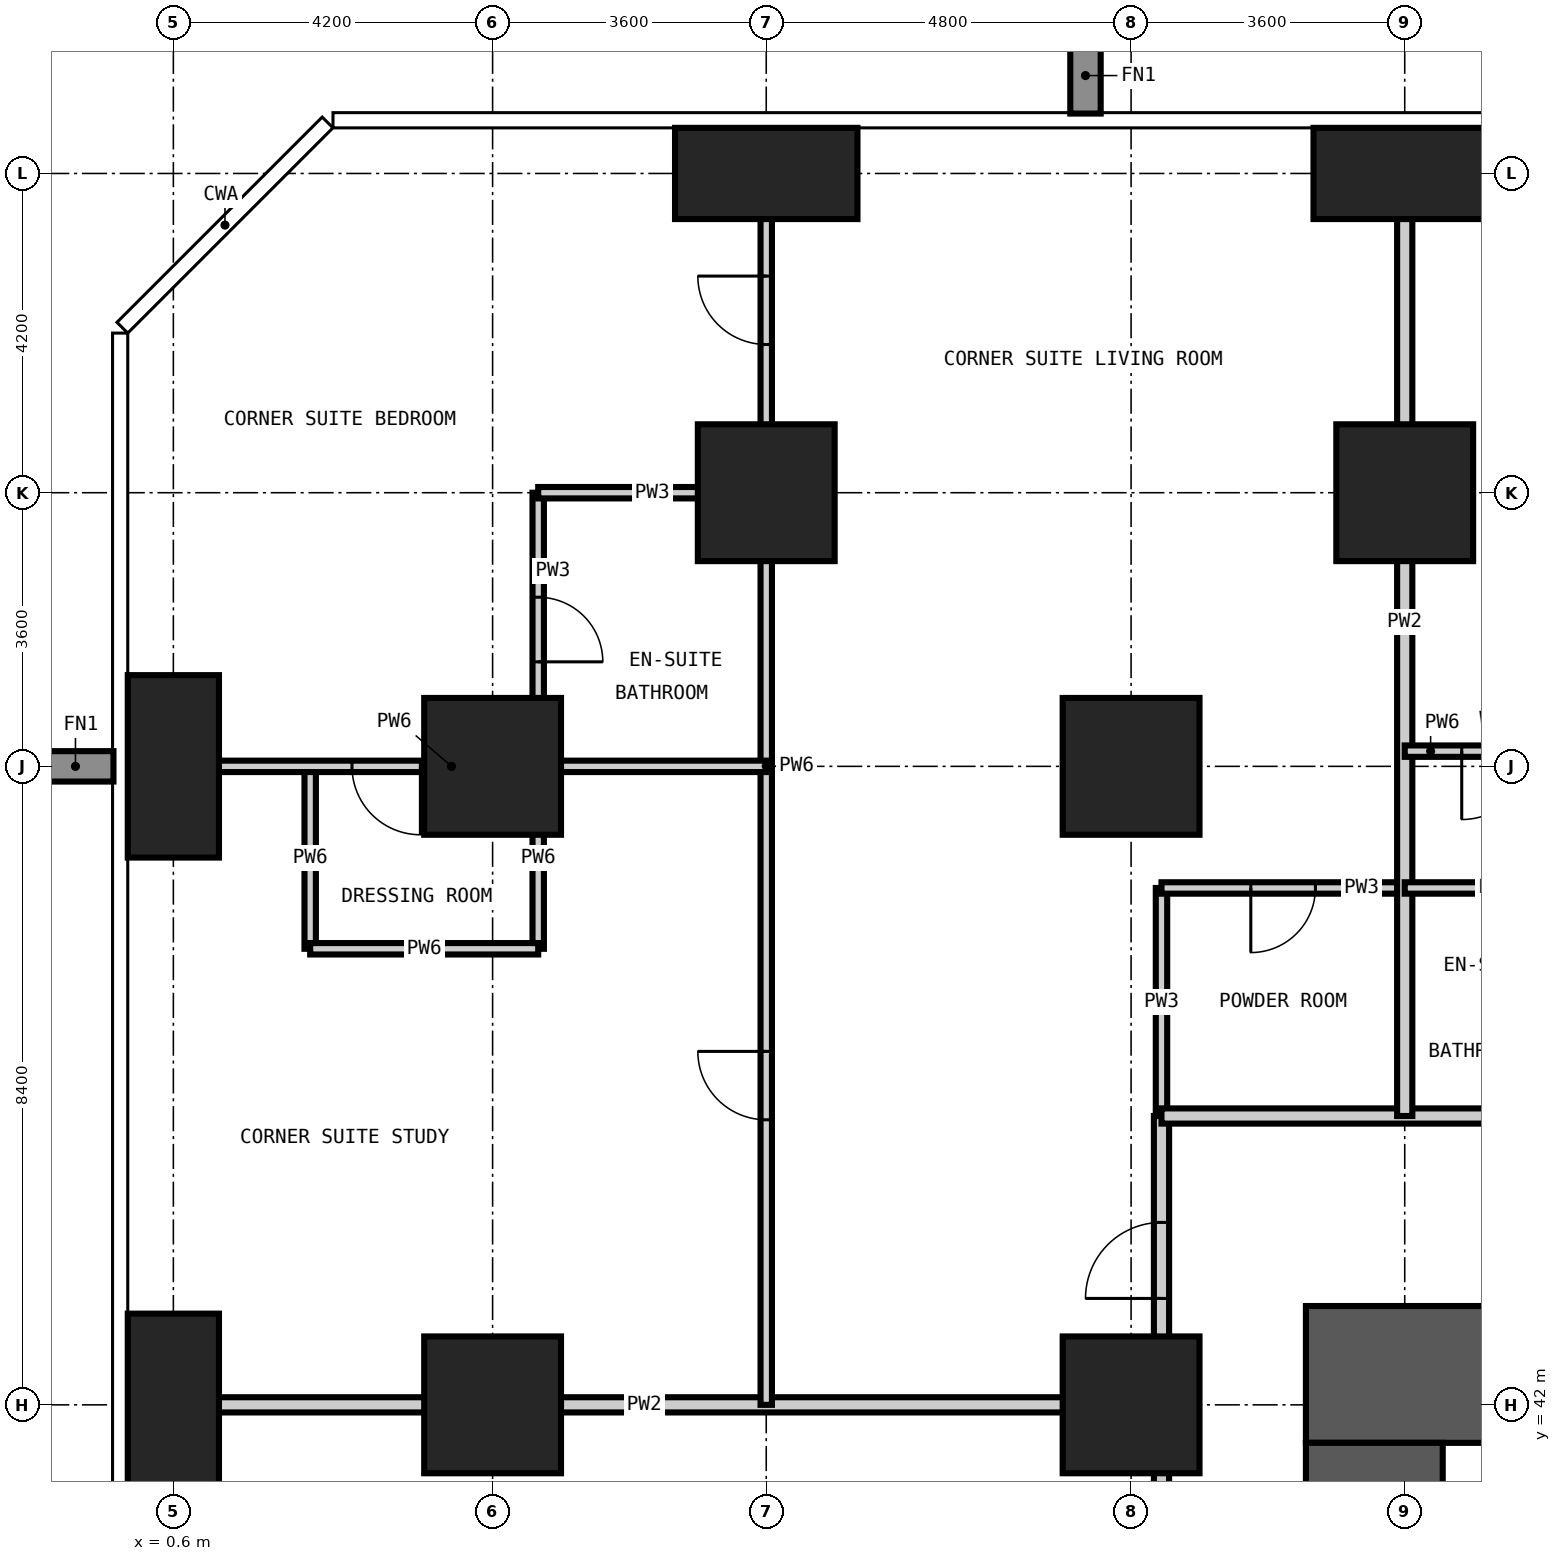
"""IFC4 building model, lengths in metres.
Left out: names, types, materials, properties, quantities, classifications, styles, units other than length and angle.
Written with IfcOpenShell. Run it as: python <this file> out.ifc"""

import sys

from ifc_helpers import new_model, si_unit, direction, frame, frame_2d, origin, origin_2d, place, context, subcontext, project, spatial, rectangle, extrude, element, fill, save


model = new_model("IFC4")
c1 = context("Model", 3, precision=1e-05, world=origin(), true_north=direction((0.0, 1.0)))
c2 = subcontext(c1, "Body", "Model", "MODEL_VIEW")
j1 = project(units=[si_unit("LENGTHUNIT", "METRE"), si_unit("PLANEANGLEUNIT", "RADIAN")], contexts=[c1])
p1 = place(None, origin())
s1 = spatial("IfcSite", under=j1, at=p1, CompositionType="ELEMENT")
p2 = place(p1, origin())
s2 = spatial("IfcBuilding", under=s1, at=p2, CompositionType="ELEMENT")
p3 = place(p2, frame((0.0, 0.0, 30.6)))
s3 = spatial("IfcBuildingStorey", under=s2, at=p3, CompositionType="ELEMENT", Elevation=30.6)
for number, where, z_axis, x_axis in (
    (1, (0.6, 42.0, -0.35), (0.0, 0.0, 1.0), (1.0, 0.0, 0.0)),
    (2, (0.6, 50.4, -0.35), (0.0, 0.0, 1.0), (1.0, 0.0, 0.0)),
):
    element("IfcColumn", number, at=place(p3, frame(where, z_axis=z_axis, x_axis=x_axis)), inside=s3, PredefinedType="COLUMN", context=c2, shape_type="SweptSolid", body=[
        extrude(rectangle(XDim=1.2, YDim=2.4, at=origin_2d()), origin(), (0.0, 0.0, 1.0), 3.6),
    ])
for number, where, z_axis, x_axis in (
    (3, (4.8, 42.0, -0.35), (0.0, 0.0, 1.0), (1.0, 0.0, 0.0)),
    (4, (4.8, 50.4, -0.35), (0.0, 0.0, 1.0), (1.0, 0.0, 0.0)),
    (5, (8.4, 54.0, -0.35), (0.0, 0.0, 1.0), (1.0, 0.0, 0.0)),
):
    element("IfcColumn", number, at=place(p3, frame(where, z_axis=z_axis, x_axis=x_axis)), inside=s3, PredefinedType="COLUMN", context=c2, shape_type="SweptSolid", body=[
        extrude(rectangle(XDim=1.8, YDim=1.8, at=origin_2d()), origin(), (0.0, 0.0, 1.0), 3.6),
    ])
p4 = place(p3, frame((8.4, 58.2, -0.35), z_axis=(0.0, 0.0, 1.0), x_axis=(1.0, 0.0, 0.0)))
e6 = element("IfcColumn", 6, at=p4, inside=s3, PredefinedType="COLUMN", context=c2, shape_type="SweptSolid", body=[
    extrude(rectangle(XDim=2.4, YDim=1.2, at=origin_2d()), origin(), (0.0, 0.0, 1.0), 3.6),
])
for number, where, z_axis, x_axis in (
    (7, (13.2, 42.0, -0.35), (0.0, 0.0, 1.0), (1.0, 0.0, 0.0)),
    (8, (13.2, 50.4, -0.35), (0.0, 0.0, 1.0), (1.0, 0.0, 0.0)),
    (9, (16.8, 54.0, -0.35), (0.0, 0.0, 1.0), (1.0, 0.0, 0.0)),
):
    element("IfcColumn", number, at=place(p3, frame(where, z_axis=z_axis, x_axis=x_axis)), inside=s3, PredefinedType="COLUMN", context=c2, shape_type="SweptSolid", body=[
        extrude(rectangle(XDim=1.8, YDim=1.8, at=origin_2d()), origin(), (0.0, 0.0, 1.0), 3.6),
    ])
p5 = place(p3, frame((16.8, 58.2, -0.35), z_axis=(0.0, 0.0, 1.0), x_axis=(1.0, 0.0, 0.0)))
e10 = element("IfcColumn", 10, at=p5, inside=s3, PredefinedType="COLUMN", context=c2, shape_type="SweptSolid", body=[
    extrude(rectangle(XDim=2.4, YDim=1.2, at=origin_2d()), origin(), (0.0, 0.0, 1.0), 3.6),
])
p6 = place(p3, frame((43.3, 42.4, -0.35), z_axis=(0.0, 0.0, 1.0), x_axis=(-1.0, 0.0, 0.0)))
e11 = element("IfcWall", 11, at=p6, inside=s3, PredefinedType="SHEAR", context=c2, shape_type="SweptSolid", body=[
    extrude(rectangle(XDim=27.8, YDim=1.8, at=frame_2d((13.9, 0.0))), origin(), (0.0, 0.0, 1.0), 3.6),
])
p7 = place(p6, frame((21.8, 0.0, 0.35)))
e12 = element("IfcOpeningElement", 12, at=p7, cuts=e11, PredefinedType="OPENING", context=c2, shape_type="SweptSolid", body=[
    extrude(rectangle(XDim=1.0, YDim=2.1, at=frame_2d((0.5, 1.05))), frame((0.0, 0.91, 0.0), z_axis=(0.0, -1.0, 0.0), x_axis=(1.0, 0.0, 0.0)), (0.0, 0.0, 1.0), 1.82),
])
p8 = place(p6, frame((11.2, 0.0, 0.35)))
e13 = element("IfcOpeningElement", 13, at=p8, cuts=e11, PredefinedType="OPENING", context=c2, shape_type="SweptSolid", body=[
    extrude(rectangle(XDim=1.2, YDim=2.2, at=frame_2d((0.6, 1.1))), frame((0.0, 0.91, 0.0), z_axis=(0.0, -1.0, 0.0), x_axis=(1.0, 0.0, 0.0)), (0.0, 0.0, 1.0), 1.82),
])
p9 = place(p3, frame((16.4, 41.5, -0.35), z_axis=(0.0, 0.0, 1.0), x_axis=(0.0, -1.0, 0.0)))
e14 = element("IfcWall", 14, at=p9, inside=s3, PredefinedType="SHEAR", context=c2, shape_type="SweptSolid", body=[
    extrude(rectangle(XDim=24.2, YDim=1.8, at=frame_2d((12.1, 0.0))), origin(), (0.0, 0.0, 1.0), 3.6),
])
p10 = place(p9, frame((11.2, 0.0, 0.35)))
e15 = element("IfcOpeningElement", 15, at=p10, cuts=e14, PredefinedType="OPENING", context=c2, shape_type="SweptSolid", body=[
    extrude(rectangle(XDim=1.8, YDim=2.2, at=frame_2d((0.9, 1.1))), frame((0.0, 0.91, 0.0), z_axis=(0.0, -1.0, 0.0), x_axis=(1.0, 0.0, 0.0)), (0.0, 0.0, 1.0), 1.82),
])
p11 = place(p9, frame((20.0, 0.0, 0.35)))
e16 = element("IfcOpeningElement", 16, at=p11, cuts=e14, PredefinedType="OPENING", context=c2, shape_type="SweptSolid", body=[
    extrude(rectangle(XDim=1.0, YDim=2.1, at=frame_2d((0.5, 1.05))), frame((0.0, 0.91, 0.0), z_axis=(0.0, -1.0, 0.0), x_axis=(1.0, 0.0, 0.0)), (0.0, 0.0, 1.0), 1.82),
])
p12 = place(p9, frame((5.3, 0.0, 0.35)))
e17 = element("IfcOpeningElement", 17, at=p12, cuts=e14, PredefinedType="OPENING", context=c2, shape_type="SweptSolid", body=[
    extrude(rectangle(XDim=1.0, YDim=2.1, at=frame_2d((0.5, 1.05))), frame((0.0, 0.91, 0.0), z_axis=(0.0, -1.0, 0.0), x_axis=(1.0, 0.0, 0.0)), (0.0, 0.0, 1.0), 1.82),
])
p13 = place(p3, frame((5.4, 50.4, 0.0), z_axis=(0.0, 0.0, 1.0), x_axis=(0.0, 1.0, 0.0)))
e18 = element("IfcWall", 18, at=p13, inside=s3, PredefinedType="PARTITIONING", context=c2, shape_type="SweptSolid", body=[
    extrude(rectangle(XDim=3.6, YDim=0.15, at=frame_2d((1.8, 0.0))), origin(), (0.0, 0.0, 1.0), 3.25),
])
p14 = place(p13, frame((1.375, 0.0, 0.0)))
e19 = element("IfcOpeningElement", 19, at=p14, cuts=e18, PredefinedType="OPENING", context=c2, shape_type="SweptSolid", body=[
    extrude(rectangle(XDim=0.85, YDim=2.1, at=frame_2d((0.425, 1.05))), frame((0.0, 0.085, 0.0), z_axis=(0.0, -1.0, 0.0), x_axis=(1.0, 0.0, 0.0)), (0.0, 0.0, 1.0), 0.17),
])
p15 = place(p3, frame((13.6, 45.8, 0.0), z_axis=(0.0, 0.0, 1.0), x_axis=(0.0, 1.0, 0.0)))
e20 = element("IfcWall", 20, at=p15, inside=s3, PredefinedType="PARTITIONING", context=c2, shape_type="SweptSolid", body=[
    extrude(rectangle(XDim=3.0, YDim=0.15, at=frame_2d((1.5, 0.0))), origin(), (0.0, 0.0, 1.0), 3.25),
])
p16 = place(p3, frame((13.6, 48.8, 0.0), z_axis=(0.0, 0.0, 1.0), x_axis=(1.0, 0.0, 0.0)))
e21 = element("IfcWall", 21, at=p16, inside=s3, PredefinedType="PARTITIONING", context=c2, shape_type="SweptSolid", body=[
    extrude(rectangle(XDim=3.2, YDim=0.15, at=frame_2d((1.6, 0.0))), origin(), (0.0, 0.0, 1.0), 3.25),
])
p17 = place(p16, frame((1.175, 0.0, 0.0)))
e22 = element("IfcOpeningElement", 22, at=p17, cuts=e21, PredefinedType="OPENING", context=c2, shape_type="SweptSolid", body=[
    extrude(rectangle(XDim=0.85, YDim=2.1, at=frame_2d((0.425, 1.05))), frame((0.0, 0.085, 0.0), z_axis=(0.0, -1.0, 0.0), x_axis=(1.0, 0.0, 0.0)), (0.0, 0.0, 1.0), 0.17),
])
p18 = place(p3, frame((5.4, 54.0, 0.0), z_axis=(0.0, 0.0, 1.0), x_axis=(1.0, 0.0, 0.0)))
e23 = element("IfcWall", 23, at=p18, inside=s3, PredefinedType="PARTITIONING", context=c2, shape_type="SweptSolid", body=[
    extrude(rectangle(XDim=3.0, YDim=0.15, at=frame_2d((1.5, 0.0))), origin(), (0.0, 0.0, 1.0), 3.25),
])
p19 = place(p3, frame((13.6, 42.0, 0.0), z_axis=(0.0, 0.0, 1.0), x_axis=(0.0, 1.0, 0.0)))
e24 = element("IfcWall", 24, at=p19, inside=s3, PredefinedType="PARTITIONING", context=c2, shape_type="SweptSolid", body=[
    extrude(rectangle(XDim=3.8, YDim=0.2, at=frame_2d((1.9, 0.0))), origin(), (0.0, 0.0, 1.0), 3.25),
])
p20 = place(p19, frame((1.4, 0.0, 0.0)))
e25 = element("IfcOpeningElement", 25, at=p20, cuts=e24, PredefinedType="OPENING", context=c2, shape_type="SweptSolid", body=[
    extrude(rectangle(XDim=1.0, YDim=2.2, at=frame_2d((0.5, 1.1))), frame((0.0, 0.11, 0.0), z_axis=(0.0, -1.0, 0.0), x_axis=(1.0, 0.0, 0.0)), (0.0, 0.0, 1.0), 0.22),
])
p21 = place(p3, frame((13.6, 45.8, 0.0), z_axis=(0.0, 0.0, 1.0), x_axis=(1.0, 0.0, 0.0)))
e26 = element("IfcWall", 26, at=p21, inside=s3, PredefinedType="PARTITIONING", context=c2, shape_type="SweptSolid", body=[
    extrude(rectangle(XDim=31.9, YDim=0.2, at=frame_2d((15.95, 0.0))), origin(), (0.0, 0.0, 1.0), 3.25),
])
p22 = place(p21, frame((6.0, 0.0, 0.0)))
e27 = element("IfcOpeningElement", 27, at=p22, cuts=e26, PredefinedType="OPENING", context=c2, shape_type="SweptSolid", body=[
    extrude(rectangle(XDim=1.0, YDim=2.2, at=frame_2d((0.5, 1.1))), frame((0.0, 0.11, 0.0), z_axis=(0.0, -1.0, 0.0), x_axis=(1.0, 0.0, 0.0)), (0.0, 0.0, 1.0), 0.22),
])
p23 = place(p21, frame((7.8, 0.0, 0.0)))
e28 = element("IfcOpeningElement", 28, at=p23, cuts=e26, PredefinedType="OPENING", context=c2, shape_type="SweptSolid", body=[
    extrude(rectangle(XDim=1.0, YDim=2.2, at=frame_2d((0.5, 1.1))), frame((0.0, 0.11, 0.0), z_axis=(0.0, -1.0, 0.0), x_axis=(1.0, 0.0, 0.0)), (0.0, 0.0, 1.0), 0.22),
])
p24 = place(p21, frame((14.4, 0.0, 0.0)))
e29 = element("IfcOpeningElement", 29, at=p24, cuts=e26, PredefinedType="OPENING", context=c2, shape_type="SweptSolid", body=[
    extrude(rectangle(XDim=1.0, YDim=2.2, at=frame_2d((0.5, 1.1))), frame((0.0, 0.11, 0.0), z_axis=(0.0, -1.0, 0.0), x_axis=(1.0, 0.0, 0.0)), (0.0, 0.0, 1.0), 0.22),
])
p25 = place(p21, frame((16.2, 0.0, 0.0)))
e30 = element("IfcOpeningElement", 30, at=p25, cuts=e26, PredefinedType="OPENING", context=c2, shape_type="SweptSolid", body=[
    extrude(rectangle(XDim=1.0, YDim=2.2, at=frame_2d((0.5, 1.1))), frame((0.0, 0.11, 0.0), z_axis=(0.0, -1.0, 0.0), x_axis=(1.0, 0.0, 0.0)), (0.0, 0.0, 1.0), 0.22),
])
p26 = place(p21, frame((22.8, 0.0, 0.0)))
e31 = element("IfcOpeningElement", 31, at=p26, cuts=e26, PredefinedType="OPENING", context=c2, shape_type="SweptSolid", body=[
    extrude(rectangle(XDim=1.0, YDim=2.2, at=frame_2d((0.5, 1.1))), frame((0.0, 0.11, 0.0), z_axis=(0.0, -1.0, 0.0), x_axis=(1.0, 0.0, 0.0)), (0.0, 0.0, 1.0), 0.22),
])
p27 = place(p21, frame((24.6, 0.0, 0.0)))
e32 = element("IfcOpeningElement", 32, at=p27, cuts=e26, PredefinedType="OPENING", context=c2, shape_type="SweptSolid", body=[
    extrude(rectangle(XDim=1.0, YDim=2.2, at=frame_2d((0.5, 1.1))), frame((0.0, 0.11, 0.0), z_axis=(0.0, -1.0, 0.0), x_axis=(1.0, 0.0, 0.0)), (0.0, 0.0, 1.0), 0.22),
])
p28 = place(p3, frame((13.6, 42.0, 0.0), z_axis=(0.0, 0.0, 1.0), x_axis=(0.0, -1.0, 0.0)))
e33 = element("IfcWall", 33, at=p28, inside=s3, PredefinedType="PARTITIONING", context=c2, shape_type="SweptSolid", body=[
    extrude(rectangle(XDim=8.4, YDim=0.2, at=frame_2d((4.2, 0.0))), origin(), (0.0, 0.0, 1.0), 3.25),
])
p29 = place(p28, frame((3.3, 0.0, 0.0)))
e34 = element("IfcOpeningElement", 34, at=p29, cuts=e33, PredefinedType="OPENING", context=c2, shape_type="SweptSolid", body=[
    extrude(rectangle(XDim=1.8, YDim=2.4, at=frame_2d((0.9, 1.2))), frame((0.0, 0.11, 0.0), z_axis=(0.0, -1.0, 0.0), x_axis=(1.0, 0.0, 0.0)), (0.0, 0.0, 1.0), 0.22),
])
p30 = place(p3, frame((16.8, 45.8, 0.0), z_axis=(0.0, 0.0, 1.0), x_axis=(0.0, 1.0, 0.0)))
e35 = element("IfcWall", 35, at=p30, inside=s3, PredefinedType="PARTITIONING", context=c2, shape_type="SweptSolid", body=[
    extrude(rectangle(XDim=13.008, YDim=0.2, at=frame_2d((6.504, 0.0))), origin(), (0.0, 0.0, 1.0), 3.25),
])
p31 = place(p3, frame((-0.008, 42.0, 0.0), z_axis=(0.0, 0.0, 1.0), x_axis=(1.0, 0.0, 0.0)))
e36 = element("IfcWall", 36, at=p31, inside=s3, PredefinedType="PARTITIONING", context=c2, shape_type="SweptSolid", body=[
    extrude(rectangle(XDim=13.608, YDim=0.2, at=frame_2d((6.804, 0.0))), origin(), (0.0, 0.0, 1.0), 3.25),
])
for number, where, z_axis, x_axis in (
    (37, (2.4, 48.0, 0.0), (0.0, 0.0, 1.0), (0.0, 1.0, 0.0)),
    (38, (5.4, 48.0, 0.0), (0.0, 0.0, 1.0), (0.0, 1.0, 0.0)),
):
    element("IfcWall", number, at=place(p3, frame(where, z_axis=z_axis, x_axis=x_axis)), inside=s3, PredefinedType="PARTITIONING", context=c2, shape_type="SweptSolid", body=[
        extrude(rectangle(XDim=2.4, YDim=0.15, at=frame_2d((1.2, 0.0))), origin(), (0.0, 0.0, 1.0), 3.25),
    ])
p32 = place(p3, frame((8.4, 42.0, 0.0), z_axis=(0.0, 0.0, 1.0), x_axis=(0.0, 1.0, 0.0)))
e39 = element("IfcWall", 39, at=p32, inside=s3, PredefinedType="PARTITIONING", context=c2, shape_type="SweptSolid", body=[
    extrude(rectangle(XDim=16.808, YDim=0.15, at=frame_2d((8.404, 0.0))), origin(), (0.0, 0.0, 1.0), 3.25),
])
p33 = place(p32, frame((13.95, 0.0, 0.0)))
e40 = element("IfcOpeningElement", 40, at=p33, cuts=e39, PredefinedType="OPENING", context=c2, shape_type="SweptSolid", body=[
    extrude(rectangle(XDim=0.9, YDim=2.1, at=frame_2d((0.45, 1.05))), frame((0.0, 0.085, 0.0), z_axis=(0.0, -1.0, 0.0), x_axis=(1.0, 0.0, 0.0)), (0.0, 0.0, 1.0), 0.17),
])
p34 = place(p32, frame((3.75, 0.0, 0.0)))
e41 = element("IfcOpeningElement", 41, at=p34, cuts=e39, PredefinedType="OPENING", context=c2, shape_type="SweptSolid", body=[
    extrude(rectangle(XDim=0.9, YDim=2.1, at=frame_2d((0.45, 1.05))), frame((0.0, 0.085, 0.0), z_axis=(0.0, -1.0, 0.0), x_axis=(1.0, 0.0, 0.0)), (0.0, 0.0, 1.0), 0.17),
])
p35 = place(p3, frame((2.4, 48.0, 0.0), z_axis=(0.0, 0.0, 1.0), x_axis=(1.0, 0.0, 0.0)))
e42 = element("IfcWall", 42, at=p35, inside=s3, PredefinedType="PARTITIONING", context=c2, shape_type="SweptSolid", body=[
    extrude(rectangle(XDim=3.0, YDim=0.15, at=frame_2d((1.5, 0.0))), origin(), (0.0, 0.0, 1.0), 3.25),
])
p36 = place(p3, frame((16.8, 48.8, 0.0), z_axis=(0.0, 0.0, 1.0), x_axis=(1.0, 0.0, 0.0)))
e43 = element("IfcWall", 43, at=p36, inside=s3, PredefinedType="PARTITIONING", context=c2, shape_type="SweptSolid", body=[
    extrude(rectangle(XDim=2.4, YDim=0.15, at=frame_2d((1.2, 0.0))), origin(), (0.0, 0.0, 1.0), 3.25),
])
p37 = place(p3, frame((-0.008, 50.4, 0.0), z_axis=(0.0, 0.0, 1.0), x_axis=(1.0, 0.0, 0.0)))
e44 = element("IfcWall", 44, at=p37, inside=s3, PredefinedType="PARTITIONING", context=c2, shape_type="SweptSolid", body=[
    extrude(rectangle(XDim=8.408, YDim=0.15, at=frame_2d((4.204, 0.0))), origin(), (0.0, 0.0, 1.0), 3.25),
])
p38 = place(p37, frame((2.958, 0.0, 0.0)))
e45 = element("IfcOpeningElement", 45, at=p38, cuts=e44, PredefinedType="OPENING", context=c2, shape_type="SweptSolid", body=[
    extrude(rectangle(XDim=0.9, YDim=2.1, at=frame_2d((0.45, 1.05))), frame((0.0, 0.085, 0.0), z_axis=(0.0, -1.0, 0.0), x_axis=(1.0, 0.0, 0.0)), (0.0, 0.0, 1.0), 0.17),
])
p39 = place(p3, frame((16.8, 50.6, 0.0), z_axis=(0.0, 0.0, 1.0), x_axis=(1.0, 0.0, 0.0)))
e46 = element("IfcWall", 46, at=p39, inside=s3, PredefinedType="PARTITIONING", context=c2, shape_type="SweptSolid", body=[
    extrude(rectangle(XDim=2.4, YDim=0.15, at=frame_2d((1.2, 0.0))), origin(), (0.0, 0.0, 1.0), 3.25),
])
p40 = place(p39, frame((0.75, 0.0, 0.0)))
e47 = element("IfcOpeningElement", 47, at=p40, cuts=e46, PredefinedType="OPENING", context=c2, shape_type="SweptSolid", body=[
    extrude(rectangle(XDim=0.9, YDim=2.1, at=frame_2d((0.45, 1.05))), frame((0.0, 0.085, 0.0), z_axis=(0.0, -1.0, 0.0), x_axis=(1.0, 0.0, 0.0)), (0.0, 0.0, 1.0), 0.17),
])
p41 = place(p40, frame((0.9, 0.0, 0.0), z_axis=(0.0, 0.0, 1.0), x_axis=(-1.0, 0.0, 0.0)))
e48 = element("IfcDoor", 48, at=p41, inside=s3, OperationType="SINGLE_SWING_RIGHT", PredefinedType="DOOR", context=c2, shape_type="SweptSolid", body=[
    extrude(rectangle(XDim=0.9, YDim=2.1, at=frame_2d((0.45, 1.05))), frame((0.0, 0.025, 0.0), z_axis=(0.0, -1.0, 0.0), x_axis=(1.0, 0.0, 0.0)), (0.0, 0.0, 1.0), 0.05),
])
fill(e47, e48)
p42 = place(p20, origin())
e49 = element("IfcDoor", 49, at=p42, inside=s3, OperationType="SINGLE_SWING_LEFT", PredefinedType="DOOR", context=c2, shape_type="SweptSolid", body=[
    extrude(rectangle(XDim=1.0, YDim=2.2, at=frame_2d((0.5, 1.1))), frame((0.0, 0.025, 0.0), z_axis=(0.0, -1.0, 0.0), x_axis=(1.0, 0.0, 0.0)), (0.0, 0.0, 1.0), 0.05),
])
fill(e25, e49)
p43 = place(p17, frame((0.85, 0.0, 0.0), z_axis=(0.0, 0.0, 1.0), x_axis=(-1.0, 0.0, 0.0)))
e50 = element("IfcDoor", 50, at=p43, inside=s3, OperationType="SINGLE_SWING_RIGHT", PredefinedType="DOOR", context=c2, shape_type="SweptSolid", body=[
    extrude(rectangle(XDim=0.85, YDim=2.1, at=frame_2d((0.425, 1.05))), frame((0.0, 0.025, 0.0), z_axis=(0.0, -1.0, 0.0), x_axis=(1.0, 0.0, 0.0)), (0.0, 0.0, 1.0), 0.05),
])
fill(e22, e50)
p44 = place(p33, origin())
e51 = element("IfcDoor", 51, at=p44, inside=s3, OperationType="SINGLE_SWING_RIGHT", PredefinedType="DOOR", context=c2, shape_type="SweptSolid", body=[
    extrude(rectangle(XDim=0.9, YDim=2.1, at=frame_2d((0.45, 1.05))), frame((0.0, 0.025, 0.0), z_axis=(0.0, -1.0, 0.0), x_axis=(1.0, 0.0, 0.0)), (0.0, 0.0, 1.0), 0.05),
])
fill(e40, e51)
p45 = place(p14, frame((0.85, 0.0, 0.0), z_axis=(0.0, 0.0, 1.0), x_axis=(-1.0, 0.0, 0.0)))
e52 = element("IfcDoor", 52, at=p45, inside=s3, OperationType="SINGLE_SWING_RIGHT", PredefinedType="DOOR", context=c2, shape_type="SweptSolid", body=[
    extrude(rectangle(XDim=0.85, YDim=2.1, at=frame_2d((0.425, 1.05))), frame((0.0, 0.025, 0.0), z_axis=(0.0, -1.0, 0.0), x_axis=(1.0, 0.0, 0.0)), (0.0, 0.0, 1.0), 0.05),
])
fill(e19, e52)
p46 = place(p38, frame((0.9, 0.0, 0.0), z_axis=(0.0, 0.0, 1.0), x_axis=(-1.0, 0.0, 0.0)))
e53 = element("IfcDoor", 53, at=p46, inside=s3, OperationType="SINGLE_SWING_LEFT", PredefinedType="DOOR", context=c2, shape_type="SweptSolid", body=[
    extrude(rectangle(XDim=0.9, YDim=2.1, at=frame_2d((0.45, 1.05))), frame((0.0, 0.025, 0.0), z_axis=(0.0, -1.0, 0.0), x_axis=(1.0, 0.0, 0.0)), (0.0, 0.0, 1.0), 0.05),
])
fill(e45, e53)
p47 = place(p34, origin())
e54 = element("IfcDoor", 54, at=p47, inside=s3, OperationType="SINGLE_SWING_RIGHT", PredefinedType="DOOR", context=c2, shape_type="SweptSolid", body=[
    extrude(rectangle(XDim=0.9, YDim=2.1, at=frame_2d((0.45, 1.05))), frame((0.0, 0.025, 0.0), z_axis=(0.0, -1.0, 0.0), x_axis=(1.0, 0.0, 0.0)), (0.0, 0.0, 1.0), 0.05),
])
fill(e41, e54)
save(model, sys.argv[1])
